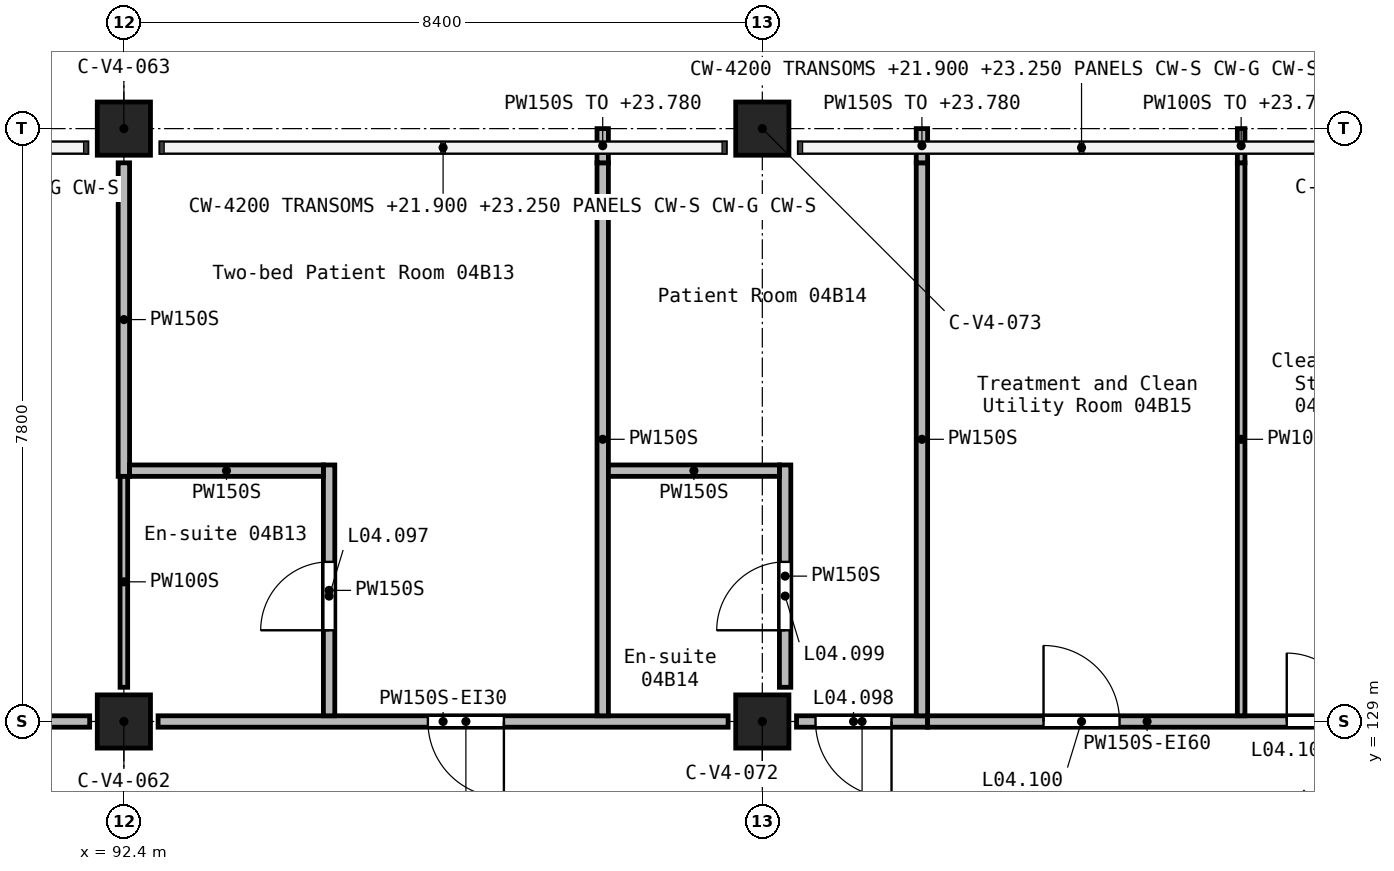
"""IFC4 building model, lengths in metres.
Left out: names, types, materials, properties, quantities, classifications, styles, units other than length and angle.
Written with IfcOpenShell. Run it as: python <this file> out.ifc"""

import sys

from ifc_helpers import new_model, si_unit, direction, frame, frame_2d, origin, origin_2d, place, context, subcontext, project, spatial, rectangle, extrude, element, fill, save


model = new_model("IFC4")
c1 = context("Model", 3, precision=1e-05, world=origin(), true_north=direction((0.0, 1.0)))
c2 = subcontext(c1, "Body", "Model", "MODEL_VIEW")
j1 = project(units=[si_unit("LENGTHUNIT", "METRE"), si_unit("PLANEANGLEUNIT", "RADIAN")], contexts=[c1])
p1 = place(None, origin())
s1 = spatial("IfcSite", under=j1, at=p1, CompositionType="ELEMENT")
p2 = place(p1, origin())
s2 = spatial("IfcBuilding", under=s1, at=p2, CompositionType="ELEMENT")
p3 = place(p2, frame((0.0, 0.0, 21.0)))
s3 = spatial("IfcBuildingStorey", under=s2, at=p3, CompositionType="ELEMENT", Elevation=21.0)
for number, where, z_axis, x_axis in (
    (1, (92.4, 129.0, 0.0), (0.0, 0.0, 1.0), (1.0, 0.0, 0.0)),
    (2, (92.4, 136.8, 0.0), (0.0, 0.0, 1.0), (1.0, 0.0, 0.0)),
    (3, (100.8, 129.0, 0.0), (0.0, 0.0, 1.0), (1.0, 0.0, 0.0)),
    (4, (100.8, 136.8, 0.0), (0.0, 0.0, 1.0), (1.0, 0.0, 0.0)),
):
    element("IfcColumn", number, at=place(p3, frame(where, z_axis=z_axis, x_axis=x_axis)), inside=s3, PredefinedType="COLUMN", context=c2, shape_type="SweptSolid", body=[
        extrude(rectangle(XDim=0.7, YDim=0.7, at=origin_2d()), origin(), (0.0, 0.0, 1.0), 3.9),
    ])
p4 = place(p3, frame((102.975, 129.0, 0.0), z_axis=(0.0, 0.0, 1.0), x_axis=(-1.0, 0.0, 0.0)))
e5 = element("IfcWall", 5, at=p4, inside=s3, PredefinedType="PARTITIONING", context=c2, shape_type="SweptSolid", body=[
    extrude(rectangle(XDim=1.725, YDim=0.15, at=frame_2d((0.863, 0.0))), origin(), (0.0, 0.0, 1.0), 3.6),
])
p5 = place(p4, frame((0.475, 0.0, 0.0)))
e6 = element("IfcOpeningElement", 6, at=p5, cuts=e5, PredefinedType="OPENING", context=c2, shape_type="SweptSolid", body=[
    extrude(rectangle(XDim=1.0, YDim=2.1, at=frame_2d((0.5, 1.05))), frame((0.0, 0.085, 0.0), z_axis=(0.0, -1.0, 0.0), x_axis=(1.0, 0.0, 0.0)), (0.0, 0.0, 1.0), 0.17),
])
p6 = place(p3, frame((100.35, 129.0, 0.0), z_axis=(0.0, 0.0, 1.0), x_axis=(-1.0, 0.0, 0.0)))
e7 = element("IfcWall", 7, at=p6, inside=s3, PredefinedType="PARTITIONING", context=c2, shape_type="SweptSolid", body=[
    extrude(rectangle(XDim=7.5, YDim=0.15, at=frame_2d((3.75, 0.0))), origin(), (0.0, 0.0, 1.0), 3.6),
])
p7 = place(p6, frame((2.95, 0.0, 0.0)))
e8 = element("IfcOpeningElement", 8, at=p7, cuts=e7, PredefinedType="OPENING", context=c2, shape_type="SweptSolid", body=[
    extrude(rectangle(XDim=1.0, YDim=2.1, at=frame_2d((0.5, 1.05))), frame((0.0, 0.085, 0.0), z_axis=(0.0, -1.0, 0.0), x_axis=(1.0, 0.0, 0.0)), (0.0, 0.0, 1.0), 0.17),
])
p8 = place(p3, frame((91.95, 129.0, 0.0), z_axis=(0.0, 0.0, 1.0), x_axis=(-1.0, 0.0, 0.0)))
e9 = element("IfcWall", 9, at=p8, inside=s3, PredefinedType="PARTITIONING", context=c2, shape_type="SweptSolid", body=[
    extrude(rectangle(XDim=7.5, YDim=0.15, at=frame_2d((3.75, 0.0))), origin(), (0.0, 0.0, 1.0), 3.6),
])
p9 = place(p8, frame((6.25, 0.0, 0.0)))
e10 = element("IfcOpeningElement", 10, at=p9, cuts=e9, PredefinedType="OPENING", context=c2, shape_type="SweptSolid", body=[
    extrude(rectangle(XDim=1.0, YDim=2.1, at=frame_2d((0.5, 1.05))), frame((0.0, 0.085, 0.0), z_axis=(0.0, -1.0, 0.0), x_axis=(1.0, 0.0, 0.0)), (0.0, 0.0, 1.0), 0.17),
])
p10 = place(p8, frame((1.8, 0.0, 0.0)))
e11 = element("IfcOpeningElement", 11, at=p10, cuts=e9, PredefinedType="OPENING", context=c2, shape_type="SweptSolid", body=[
    extrude(rectangle(XDim=1.8, YDim=2.1, at=frame_2d((0.9, 1.05))), frame((0.0, 0.085, 0.0), z_axis=(0.0, -1.0, 0.0), x_axis=(1.0, 0.0, 0.0)), (0.0, 0.0, 1.0), 0.17),
])
p11 = place(p3, frame((102.975, 129.0, 0.0), z_axis=(0.0, 0.0, 1.0), x_axis=(1.0, 0.0, 0.0)))
e12 = element("IfcWall", 12, at=p11, inside=s3, PredefinedType="PARTITIONING", context=c2, shape_type="SweptSolid", body=[
    extrude(rectangle(XDim=5.775, YDim=0.15, at=frame_2d((2.887, 0.0))), origin(), (0.0, 0.0, 1.0), 3.6),
])
p12 = place(p11, frame((1.525, 0.0, 0.0)))
e13 = element("IfcOpeningElement", 13, at=p12, cuts=e12, PredefinedType="OPENING", context=c2, shape_type="SweptSolid", body=[
    extrude(rectangle(XDim=1.0, YDim=2.1, at=frame_2d((0.5, 1.05))), frame((0.0, 0.085, 0.0), z_axis=(0.0, -1.0, 0.0), x_axis=(1.0, 0.0, 0.0)), (0.0, 0.0, 1.0), 0.17),
])
p13 = place(p11, frame((4.725, 0.0, 0.0)))
e14 = element("IfcOpeningElement", 14, at=p13, cuts=e12, PredefinedType="OPENING", context=c2, shape_type="SweptSolid", body=[
    extrude(rectangle(XDim=0.9, YDim=2.1, at=frame_2d((0.45, 1.05))), frame((0.0, 0.085, 0.0), z_axis=(0.0, -1.0, 0.0), x_axis=(1.0, 0.0, 0.0)), (0.0, 0.0, 1.0), 0.17),
])
p14 = place(p3, frame((98.7, 129.075, 0.0), z_axis=(0.0, 0.0, 1.0), x_axis=(0.0, 1.0, 0.0)))
e15 = element("IfcWall", 15, at=p14, inside=s3, PredefinedType="PARTITIONING", context=c2, shape_type="SweptSolid", body=[
    extrude(rectangle(XDim=7.275, YDim=0.15, at=frame_2d((3.638, 0.0))), origin(), (0.0, 0.0, 1.0), 3.6),
])
p15 = place(p3, frame((98.7, 136.35, 0.0), z_axis=(0.0, 0.0, 1.0), x_axis=(0.0, 1.0, 0.0)))
e16 = element("IfcWall", 16, at=p15, inside=s3, PredefinedType="PARTITIONING", context=c2, shape_type="SweptSolid", body=[
    extrude(rectangle(XDim=0.45, YDim=0.15, at=frame_2d((0.225, 0.0))), origin(), (0.0, 0.0, 1.0), 2.78),
])
p16 = place(p3, frame((102.9, 129.075, 0.0), z_axis=(0.0, 0.0, 1.0), x_axis=(0.0, 1.0, 0.0)))
e17 = element("IfcWall", 17, at=p16, inside=s3, PredefinedType="PARTITIONING", context=c2, shape_type="SweptSolid", body=[
    extrude(rectangle(XDim=7.275, YDim=0.15, at=frame_2d((3.638, 0.0))), origin(), (0.0, 0.0, 1.0), 3.6),
])
p17 = place(p3, frame((102.9, 136.35, 0.0), z_axis=(0.0, 0.0, 1.0), x_axis=(0.0, 1.0, 0.0)))
e18 = element("IfcWall", 18, at=p17, inside=s3, PredefinedType="PARTITIONING", context=c2, shape_type="SweptSolid", body=[
    extrude(rectangle(XDim=0.45, YDim=0.15, at=frame_2d((0.225, 0.0))), origin(), (0.0, 0.0, 1.0), 2.78),
])
p18 = place(p3, frame((92.4, 132.225, 0.0), z_axis=(0.0, 0.0, 1.0), x_axis=(0.0, 1.0, 0.0)))
e19 = element("IfcWall", 19, at=p18, inside=s3, PredefinedType="PARTITIONING", context=c2, shape_type="SweptSolid", body=[
    extrude(rectangle(XDim=4.125, YDim=0.15, at=frame_2d((2.062, 0.0))), origin(), (0.0, 0.0, 1.0), 3.6),
])
p19 = place(p3, frame((95.1, 129.075, 0.0), z_axis=(0.0, 0.0, 1.0), x_axis=(0.0, 1.0, 0.0)))
e20 = element("IfcWall", 20, at=p19, inside=s3, PredefinedType="PARTITIONING", context=c2, shape_type="SweptSolid", body=[
    extrude(rectangle(XDim=3.3, YDim=0.15, at=frame_2d((1.65, 0.0))), origin(), (0.0, 0.0, 1.0), 3.6),
])
p20 = place(p19, frame((1.125, 0.0, 0.0)))
e21 = element("IfcOpeningElement", 21, at=p20, cuts=e20, PredefinedType="OPENING", context=c2, shape_type="SweptSolid", body=[
    extrude(rectangle(XDim=0.9, YDim=2.1, at=frame_2d((0.45, 1.05))), frame((0.0, 0.085, 0.0), z_axis=(0.0, -1.0, 0.0), x_axis=(1.0, 0.0, 0.0)), (0.0, 0.0, 1.0), 0.17),
])
p21 = place(p3, frame((101.1, 129.45, 0.0), z_axis=(0.0, 0.0, 1.0), x_axis=(0.0, 1.0, 0.0)))
e22 = element("IfcWall", 22, at=p21, inside=s3, PredefinedType="PARTITIONING", context=c2, shape_type="SweptSolid", body=[
    extrude(rectangle(XDim=2.925, YDim=0.15, at=frame_2d((1.462, 0.0))), origin(), (0.0, 0.0, 1.0), 3.6),
])
p22 = place(p21, frame((0.75, 0.0, 0.0)))
e23 = element("IfcOpeningElement", 23, at=p22, cuts=e22, PredefinedType="OPENING", context=c2, shape_type="SweptSolid", body=[
    extrude(rectangle(XDim=0.9, YDim=2.1, at=frame_2d((0.45, 1.05))), frame((0.0, 0.085, 0.0), z_axis=(0.0, -1.0, 0.0), x_axis=(1.0, 0.0, 0.0)), (0.0, 0.0, 1.0), 0.17),
])
p23 = place(p3, frame((92.475, 132.3, 0.0), z_axis=(0.0, 0.0, 1.0), x_axis=(1.0, 0.0, 0.0)))
e24 = element("IfcWall", 24, at=p23, inside=s3, PredefinedType="PARTITIONING", context=c2, shape_type="SweptSolid", body=[
    extrude(rectangle(XDim=2.55, YDim=0.15, at=frame_2d((1.275, 0.0))), origin(), (0.0, 0.0, 1.0), 3.6),
])
p24 = place(p3, frame((98.775, 132.3, 0.0), z_axis=(0.0, 0.0, 1.0), x_axis=(1.0, 0.0, 0.0)))
e25 = element("IfcWall", 25, at=p24, inside=s3, PredefinedType="PARTITIONING", context=c2, shape_type="SweptSolid", body=[
    extrude(rectangle(XDim=2.25, YDim=0.15, at=frame_2d((1.125, 0.0))), origin(), (0.0, 0.0, 1.0), 3.6),
])
p25 = place(p3, frame((107.1, 129.075, 0.0), z_axis=(0.0, 0.0, 1.0), x_axis=(0.0, 1.0, 0.0)))
e26 = element("IfcWall", 26, at=p25, inside=s3, PredefinedType="PARTITIONING", context=c2, shape_type="SweptSolid", body=[
    extrude(rectangle(XDim=7.275, YDim=0.1, at=frame_2d((3.638, 0.0))), origin(), (0.0, 0.0, 1.0), 3.6),
])
p26 = place(p3, frame((107.1, 136.35, 0.0), z_axis=(0.0, 0.0, 1.0), x_axis=(0.0, 1.0, 0.0)))
e27 = element("IfcWall", 27, at=p26, inside=s3, PredefinedType="PARTITIONING", context=c2, shape_type="SweptSolid", body=[
    extrude(rectangle(XDim=0.45, YDim=0.1, at=frame_2d((0.225, 0.0))), origin(), (0.0, 0.0, 1.0), 2.78),
])
p27 = place(p3, frame((92.4, 129.45, 0.0), z_axis=(0.0, 0.0, 1.0), x_axis=(0.0, 1.0, 0.0)))
e28 = element("IfcWall", 28, at=p27, inside=s3, PredefinedType="PARTITIONING", context=c2, shape_type="SweptSolid", body=[
    extrude(rectangle(XDim=2.775, YDim=0.1, at=frame_2d((1.388, 0.0))), origin(), (0.0, 0.0, 1.0), 3.6),
])
p28 = place(p7, frame((1.0, 0.0, 0.0), z_axis=(0.0, 0.0, 1.0), x_axis=(-1.0, 0.0, 0.0)))
e29 = element("IfcDoor", 29, at=p28, inside=s3, OperationType="SINGLE_SWING_RIGHT", PredefinedType="DOOR", context=c2, shape_type="SweptSolid", body=[
    extrude(rectangle(XDim=1.0, YDim=2.1, at=frame_2d((0.5, 1.05))), frame((0.0, 0.025, 0.0), z_axis=(0.0, -1.0, 0.0), x_axis=(1.0, 0.0, 0.0)), (0.0, 0.0, 1.0), 0.05),
])
fill(e8, e29)
p29 = place(p20, origin())
e30 = element("IfcDoor", 30, at=p29, inside=s3, OperationType="SINGLE_SWING_LEFT", PredefinedType="DOOR", context=c2, shape_type="SweptSolid", body=[
    extrude(rectangle(XDim=0.9, YDim=2.1, at=frame_2d((0.45, 1.05))), frame((0.0, 0.025, 0.0), z_axis=(0.0, -1.0, 0.0), x_axis=(1.0, 0.0, 0.0)), (0.0, 0.0, 1.0), 0.05),
])
fill(e21, e30)
p30 = place(p5, frame((1.0, 0.0, 0.0), z_axis=(0.0, 0.0, 1.0), x_axis=(-1.0, 0.0, 0.0)))
e31 = element("IfcDoor", 31, at=p30, inside=s3, OperationType="SINGLE_SWING_LEFT", PredefinedType="DOOR", context=c2, shape_type="SweptSolid", body=[
    extrude(rectangle(XDim=1.0, YDim=2.1, at=frame_2d((0.5, 1.05))), frame((0.0, 0.025, 0.0), z_axis=(0.0, -1.0, 0.0), x_axis=(1.0, 0.0, 0.0)), (0.0, 0.0, 1.0), 0.05),
])
fill(e6, e31)
p31 = place(p22, origin())
e32 = element("IfcDoor", 32, at=p31, inside=s3, OperationType="SINGLE_SWING_LEFT", PredefinedType="DOOR", context=c2, shape_type="SweptSolid", body=[
    extrude(rectangle(XDim=0.9, YDim=2.1, at=frame_2d((0.45, 1.05))), frame((0.0, 0.025, 0.0), z_axis=(0.0, -1.0, 0.0), x_axis=(1.0, 0.0, 0.0)), (0.0, 0.0, 1.0), 0.05),
])
fill(e23, e32)
p32 = place(p12, origin())
e33 = element("IfcDoor", 33, at=p32, inside=s3, OperationType="SINGLE_SWING_LEFT", PredefinedType="DOOR", context=c2, shape_type="SweptSolid", body=[
    extrude(rectangle(XDim=1.0, YDim=2.1, at=frame_2d((0.5, 1.05))), frame((0.0, 0.025, 0.0), z_axis=(0.0, -1.0, 0.0), x_axis=(1.0, 0.0, 0.0)), (0.0, 0.0, 1.0), 0.05),
])
fill(e13, e33)
p33 = place(p13, origin())
e34 = element("IfcDoor", 34, at=p33, inside=s3, OperationType="SINGLE_SWING_RIGHT", PredefinedType="DOOR", context=c2, shape_type="SweptSolid", body=[
    extrude(rectangle(XDim=0.9, YDim=2.1, at=frame_2d((0.45, 1.05))), frame((0.0, 0.025, 0.0), z_axis=(0.0, -1.0, 0.0), x_axis=(1.0, 0.0, 0.0)), (0.0, 0.0, 1.0), 0.05),
])
fill(e14, e34)
save(model, sys.argv[1])
